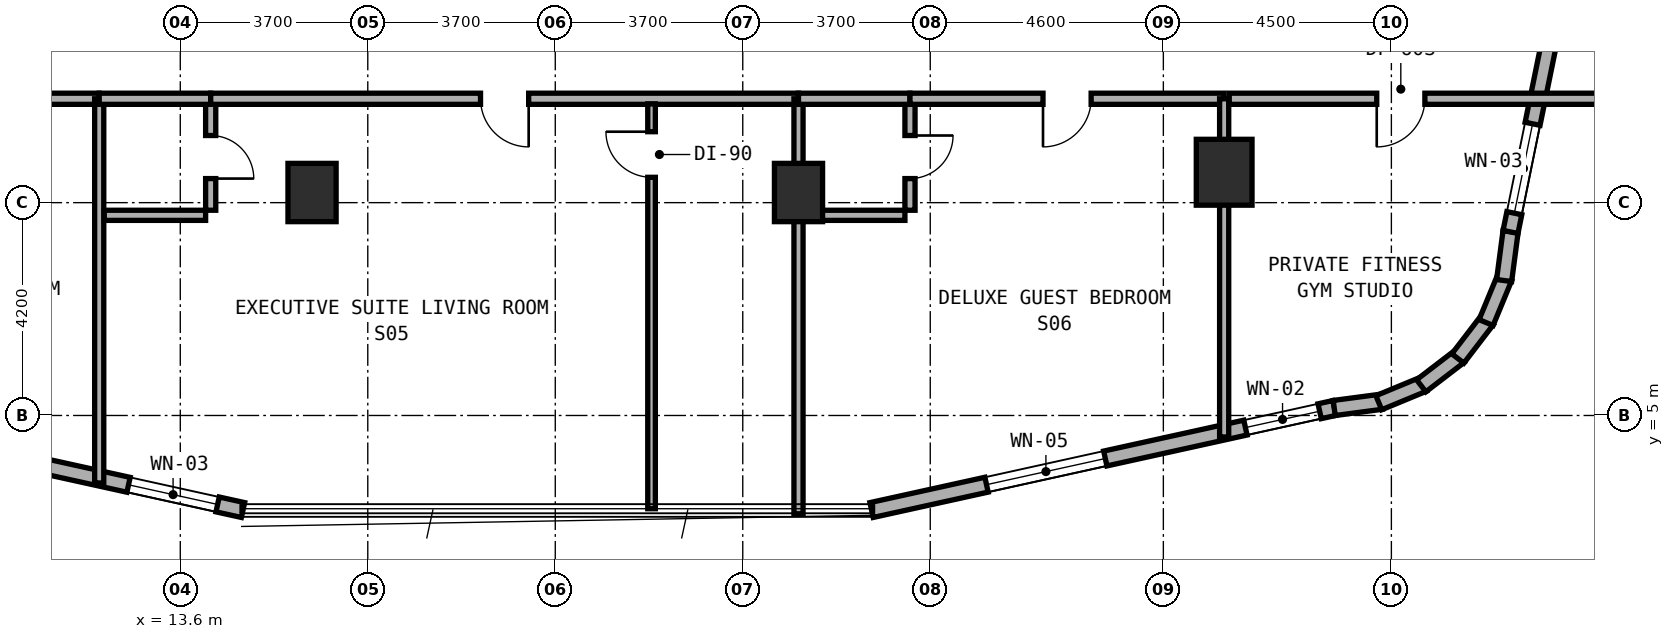
"""IFC4 building model, lengths in metres.
Left out: names, types, materials, properties, quantities, classifications, styles, units other than length and angle.
Written with IfcOpenShell. Run it as: python <this file> out.ifc"""

import sys

from ifc_helpers import new_model, si_unit, direction, frame, frame_2d, origin, origin_2d, place, context, subcontext, project, spatial, rectangle, extrude, element, fill, save


model = new_model("IFC4")
c1 = context("Model", 3, precision=1e-05, world=origin(), true_north=direction((0.0, 1.0)))
c2 = subcontext(c1, "Body", "Model", "MODEL_VIEW")
j1 = project(units=[si_unit("LENGTHUNIT", "METRE"), si_unit("PLANEANGLEUNIT", "RADIAN")], contexts=[c1])
p1 = place(None, origin())
s1 = spatial("IfcSite", under=j1, at=p1, CompositionType="ELEMENT")
p2 = place(p1, origin())
s2 = spatial("IfcBuilding", under=s1, at=p2, CompositionType="ELEMENT")
p3 = place(p2, frame((0.0, 0.0, 38.0)))
s3 = spatial("IfcBuildingStorey", under=s2, at=p3, CompositionType="ELEMENT", Elevation=38.0)
for number, where, z_axis, x_axis in (
    (1, (16.2, 9.4, 0.0), (0.0, 0.0, 1.0), (1.0, 0.0, 0.0)),
    (2, (25.8, 9.4, 0.0), (0.0, 0.0, 1.0), (1.0, 0.0, 0.0)),
):
    element("IfcColumn", number, at=place(p3, frame(where, z_axis=z_axis, x_axis=x_axis)), inside=s3, PredefinedType="COLUMN", context=c2, shape_type="SweptSolid", body=[
        extrude(rectangle(XDim=0.95, YDim=1.15, at=origin_2d()), origin(), (0.0, 0.0, 1.0), 3.5),
    ])
p4 = place(p3, frame((34.2, 9.8, 0.0), z_axis=(0.0, 0.0, 1.0), x_axis=(1.0, 0.0, 0.0)))
e3 = element("IfcColumn", 3, at=p4, inside=s3, PredefinedType="COLUMN", context=c2, shape_type="SweptSolid", body=[
    extrude(rectangle(XDim=1.1, YDim=1.3, at=origin_2d()), origin(), (0.0, 0.0, 1.0), 3.5),
])
p5 = place(p3, frame((5.704, 5.148, 0.0), z_axis=(0.0, 0.0, 1.0), x_axis=(0.9765437942, -0.215318875183, 0.0)))
e4 = element("IfcWall", 4, at=p5, inside=s3, PredefinedType="STANDARD", context=c2, shape_type="SweptSolid", body=[
    extrude(rectangle(XDim=9.353, YDim=0.3, at=frame_2d((4.677, 0.0))), origin(), (0.0, 0.0, 1.0), 3.22),
])
p6 = place(p5, frame((1.958, 0.0, 0.8)))
e5 = element("IfcOpeningElement", 5, at=p6, cuts=e4, PredefinedType="OPENING", context=c2, shape_type="SweptSolid", body=[
    extrude(rectangle(XDim=2.4, YDim=1.6, at=frame_2d((1.2, 0.8))), frame((0.0, 0.16, 0.0), z_axis=(0.0, -1.0, 0.0), x_axis=(1.0, 0.0, 0.0)), (0.0, 0.0, 1.0), 0.32),
])
p7 = place(p5, frame((7.04, 0.0, 0.85)))
e6 = element("IfcOpeningElement", 6, at=p7, cuts=e4, PredefinedType="OPENING", context=c2, shape_type="SweptSolid", body=[
    extrude(rectangle(XDim=1.8, YDim=1.5, at=frame_2d((0.9, 0.75))), frame((0.0, 0.16, 0.0), z_axis=(0.0, -1.0, 0.0), x_axis=(1.0, 0.0, 0.0)), (0.0, 0.0, 1.0), 0.32),
])
p8 = place(p3, frame((27.242, 3.134, 0.0), z_axis=(0.0, 0.0, 1.0), x_axis=(0.97654500432, 0.215313386808, 0.0)))
e7 = element("IfcWall", 7, at=p8, inside=s3, PredefinedType="STANDARD", context=c2, shape_type="SweptSolid", body=[
    extrude(rectangle(XDim=9.354, YDim=0.3, at=frame_2d((4.677, 0.0))), origin(), (0.0, 0.0, 1.0), 3.22),
])
p9 = place(p8, frame((2.323, 0.0, 0.8)))
e8 = element("IfcOpeningElement", 8, at=p9, cuts=e7, PredefinedType="OPENING", context=c2, shape_type="SweptSolid", body=[
    extrude(rectangle(XDim=2.4, YDim=1.6, at=frame_2d((1.2, 0.8))), frame((0.0, 0.16, 0.0), z_axis=(0.0, -1.0, 0.0), x_axis=(1.0, 0.0, 0.0)), (0.0, 0.0, 1.0), 0.32),
])
p10 = place(p8, frame((7.555, 0.0, 0.85)))
e9 = element("IfcOpeningElement", 9, at=p10, cuts=e7, PredefinedType="OPENING", context=c2, shape_type="SweptSolid", body=[
    extrude(rectangle(XDim=1.5, YDim=1.5, at=frame_2d((0.75, 0.75))), frame((0.0, 0.16, 0.0), z_axis=(0.0, -1.0, 0.0), x_axis=(1.0, 0.0, 0.0)), (0.0, 0.0, 1.0), 0.32),
])
p11 = place(p3, frame((36.372, 5.148, 0.0), z_axis=(0.0, 0.0, 1.0), x_axis=(0.991359246108, 0.131174864804, 0.0)))
e10 = element("IfcWall", 10, at=p11, inside=s3, PredefinedType="STANDARD", context=c2, shape_type="SweptSolid", body=[
    extrude(rectangle(XDim=0.938, YDim=0.3, at=frame_2d((0.469, 0.0))), origin(), (0.0, 0.0, 1.0), 3.22),
])
p12 = place(p3, frame((37.252, 5.252, 0.0), z_axis=(0.0, 0.0, 1.0), x_axis=(0.924019948111, 0.382344263057, 0.0)))
e11 = element("IfcWall", 11, at=p12, inside=s3, PredefinedType="STANDARD", context=c2, shape_type="SweptSolid", body=[
    extrude(rectangle(XDim=0.955, YDim=0.3, at=frame_2d((0.477, 0.0))), origin(), (0.0, 0.0, 1.0), 3.22),
])
p13 = place(p3, frame((38.089, 5.586, 0.0), z_axis=(0.0, 0.0, 1.0), x_axis=(0.793573440799, 0.608474481025, 0.0)))
e12 = element("IfcWall", 12, at=p13, inside=s3, PredefinedType="STANDARD", context=c2, shape_type="SweptSolid", body=[
    extrude(rectangle(XDim=0.955, YDim=0.3, at=frame_2d((0.478, 0.0))), origin(), (0.0, 0.0, 1.0), 3.22),
])
p14 = place(p3, frame((38.812, 6.125, 0.0), z_axis=(0.0, 0.0, 1.0), x_axis=(0.608351047625, 0.793668068435, 0.0)))
e13 = element("IfcWall", 13, at=p14, inside=s3, PredefinedType="STANDARD", context=c2, shape_type="SweptSolid", body=[
    extrude(rectangle(XDim=0.955, YDim=0.3, at=frame_2d((0.478, 0.0))), origin(), (0.0, 0.0, 1.0), 3.22),
])
p15 = place(p3, frame((39.369, 6.834, 0.0), z_axis=(0.0, 0.0, 1.0), x_axis=(0.382344263057, 0.924019948111, 0.0)))
e14 = element("IfcWall", 14, at=p15, inside=s3, PredefinedType="STANDARD", context=c2, shape_type="SweptSolid", body=[
    extrude(rectangle(XDim=0.955, YDim=0.3, at=frame_2d((0.477, 0.0))), origin(), (0.0, 0.0, 1.0), 3.22),
])
p16 = place(p3, frame((39.725, 7.663, 0.0), z_axis=(0.0, 0.0, 1.0), x_axis=(0.130454512571, 0.991454295543, 0.0)))
e15 = element("IfcWall", 15, at=p16, inside=s3, PredefinedType="STANDARD", context=c2, shape_type="SweptSolid", body=[
    extrude(rectangle(XDim=0.973, YDim=0.3, at=frame_2d((0.487, 0.0))), origin(), (0.0, 0.0, 1.0), 3.22),
])
p17 = place(p3, frame((39.851, 8.622, 0.0), z_axis=(0.0, 0.0, 1.0), x_axis=(0.199990901713, 0.979797754249, 0.0)))
e16 = element("IfcWall", 16, at=p17, inside=s3, PredefinedType="STANDARD", context=c2, shape_type="SweptSolid", body=[
    extrude(rectangle(XDim=10.065, YDim=0.3, at=frame_2d((5.033, 0.0))), origin(), (0.0, 0.0, 1.0), 3.22),
])
p18 = place(p17, frame((0.378, 0.0, 0.85)))
e17 = element("IfcOpeningElement", 17, at=p18, cuts=e16, PredefinedType="OPENING", context=c2, shape_type="SweptSolid", body=[
    extrude(rectangle(XDim=1.8, YDim=1.5, at=frame_2d((0.9, 0.75))), frame((0.0, 0.16, 0.0), z_axis=(0.0, -1.0, 0.0), x_axis=(1.0, 0.0, 0.0)), (0.0, 0.0, 1.0), 0.32),
])
p19 = place(p17, frame((5.236, 0.0, 0.8)))
e18 = element("IfcOpeningElement", 18, at=p19, cuts=e16, PredefinedType="OPENING", context=c2, shape_type="SweptSolid", body=[
    extrude(rectangle(XDim=2.4, YDim=1.6, at=frame_2d((1.2, 0.8))), frame((0.0, 0.16, 0.0), z_axis=(0.0, -1.0, 0.0), x_axis=(1.0, 0.0, 0.0)), (0.0, 0.0, 1.0), 0.32),
])
p20 = place(p3, frame((5.55, 11.25, 0.0), z_axis=(0.0, 0.0, 1.0), x_axis=(1.0, 0.0, 0.0)))
e19 = element("IfcWall", 19, at=p20, inside=s3, PredefinedType="SOLIDWALL", context=c2, shape_type="SweptSolid", body=[
    extrude(rectangle(XDim=6.45, YDim=0.22, at=frame_2d((3.225, 0.0))), origin(), (0.0, 0.0, 1.0), 2.395),
])
p21 = place(p20, frame((3.03, 0.0, 0.0)))
e20 = element("IfcOpeningElement", 20, at=p21, cuts=e19, PredefinedType="OPENING", context=c2, shape_type="SweptSolid", body=[
    extrude(rectangle(XDim=0.95, YDim=2.1, at=frame_2d((0.475, 1.05))), frame((0.0, 0.12, 0.0), z_axis=(0.0, -1.0, 0.0), x_axis=(1.0, 0.0, 0.0)), (0.0, 0.0, 1.0), 0.24),
])
p22 = place(p3, frame((12.0, 3.668, 0.0), z_axis=(0.0, 0.0, 1.0), x_axis=(0.0, 1.0, 0.0)))
e21 = element("IfcWall", 21, at=p22, inside=s3, PredefinedType="SOLIDWALL", context=c2, shape_type="SweptSolid", body=[
    extrude(rectangle(XDim=7.582, YDim=0.18, at=frame_2d((3.791, 0.0))), origin(), (0.0, 0.0, 1.0), 2.745),
])
p23 = place(p3, frame((14.2, 9.05, 0.0), z_axis=(0.0, 0.0, 1.0), x_axis=(0.0, 1.0, 0.0)))
e22 = element("IfcWall", 22, at=p23, inside=s3, PredefinedType="PLUMBINGWALL", context=c2, shape_type="SweptSolid", body=[
    extrude(rectangle(XDim=2.1, YDim=0.2, at=frame_2d((1.05, 0.0))), origin(), (0.0, 0.0, 1.0), 2.745),
])
p24 = place(p23, frame((0.625, 0.0, 0.0)))
e23 = element("IfcOpeningElement", 23, at=p24, cuts=e22, PredefinedType="OPENING", context=c2, shape_type="SweptSolid", body=[
    extrude(rectangle(XDim=0.85, YDim=2.1, at=frame_2d((0.425, 1.05))), frame((0.0, 0.11, 0.0), z_axis=(0.0, -1.0, 0.0), x_axis=(1.0, 0.0, 0.0)), (0.0, 0.0, 1.0), 0.22),
])
p25 = place(p3, frame((12.1, 8.95, 0.0), z_axis=(0.0, 0.0, 1.0), x_axis=(1.0, 0.0, 0.0)))
e24 = element("IfcWall", 24, at=p25, inside=s3, PredefinedType="PLUMBINGWALL", context=c2, shape_type="SweptSolid", body=[
    extrude(rectangle(XDim=2.0, YDim=0.2, at=frame_2d((1.0, 0.0))), origin(), (0.0, 0.0, 1.0), 3.22),
])
p26 = place(p3, frame((12.0, 11.25, 0.0), z_axis=(0.0, 0.0, 1.0), x_axis=(1.0, 0.0, 0.0)))
e25 = element("IfcWall", 25, at=p26, inside=s3, PredefinedType="SOLIDWALL", context=c2, shape_type="SweptSolid", body=[
    extrude(rectangle(XDim=2.2, YDim=0.22, at=frame_2d((1.1, 0.0))), origin(), (0.0, 0.0, 1.0), 2.865),
])
p27 = place(p3, frame((14.2, 11.25, 0.0), z_axis=(0.0, 0.0, 1.0), x_axis=(1.0, 0.0, 0.0)))
e26 = element("IfcWall", 26, at=p27, inside=s3, PredefinedType="SOLIDWALL", context=c2, shape_type="SweptSolid", body=[
    extrude(rectangle(XDim=11.6, YDim=0.22, at=frame_2d((5.8, 0.0))), origin(), (0.0, 0.0, 1.0), 2.395),
])
p28 = place(p27, frame((5.325, 0.0, 0.0)))
e27 = element("IfcOpeningElement", 27, at=p28, cuts=e26, PredefinedType="OPENING", context=c2, shape_type="SweptSolid", body=[
    extrude(rectangle(XDim=0.95, YDim=2.1, at=frame_2d((0.475, 1.05))), frame((0.0, 0.12, 0.0), z_axis=(0.0, -1.0, 0.0), x_axis=(1.0, 0.0, 0.0)), (0.0, 0.0, 1.0), 0.24),
])
p29 = place(p3, frame((22.9, 3.16, 0.0), z_axis=(0.0, 0.0, 1.0), x_axis=(0.0, 1.0, 0.0)))
e28 = element("IfcWall", 28, at=p29, inside=s3, PredefinedType="PARTITIONING", context=c2, shape_type="SweptSolid", body=[
    extrude(rectangle(XDim=7.99, YDim=0.15, at=frame_2d((3.995, 0.0))), origin(), (0.0, 0.0, 1.0), 2.745),
])
p30 = place(p29, frame((6.54, 0.0, 0.0)))
e29 = element("IfcOpeningElement", 29, at=p30, cuts=e28, PredefinedType="OPENING", context=c2, shape_type="SweptSolid", body=[
    extrude(rectangle(XDim=0.9, YDim=2.1, at=frame_2d((0.45, 1.05))), frame((0.0, 0.085, 0.0), z_axis=(0.0, -1.0, 0.0), x_axis=(1.0, 0.0, 0.0)), (0.0, 0.0, 1.0), 0.17),
])
p31 = place(p3, frame((25.8, 3.06, 0.0), z_axis=(0.0, 0.0, 1.0), x_axis=(0.0, 1.0, 0.0)))
e30 = element("IfcWall", 30, at=p31, inside=s3, PredefinedType="SOLIDWALL", context=c2, shape_type="SweptSolid", body=[
    extrude(rectangle(XDim=8.19, YDim=0.18, at=frame_2d((4.095, 0.0))), origin(), (0.0, 0.0, 1.0), 2.395),
])
p32 = place(p3, frame((28.0, 9.05, 0.0), z_axis=(0.0, 0.0, 1.0), x_axis=(0.0, 1.0, 0.0)))
e31 = element("IfcWall", 31, at=p32, inside=s3, PredefinedType="PLUMBINGWALL", context=c2, shape_type="SweptSolid", body=[
    extrude(rectangle(XDim=2.1, YDim=0.2, at=frame_2d((1.05, 0.0))), origin(), (0.0, 0.0, 1.0), 2.745),
])
p33 = place(p32, frame((0.625, 0.0, 0.0)))
e32 = element("IfcOpeningElement", 32, at=p33, cuts=e31, PredefinedType="OPENING", context=c2, shape_type="SweptSolid", body=[
    extrude(rectangle(XDim=0.85, YDim=2.1, at=frame_2d((0.425, 1.05))), frame((0.0, 0.11, 0.0), z_axis=(0.0, -1.0, 0.0), x_axis=(1.0, 0.0, 0.0)), (0.0, 0.0, 1.0), 0.22),
])
p34 = place(p3, frame((25.9, 8.95, 0.0), z_axis=(0.0, 0.0, 1.0), x_axis=(1.0, 0.0, 0.0)))
e33 = element("IfcWall", 33, at=p34, inside=s3, PredefinedType="PLUMBINGWALL", context=c2, shape_type="SweptSolid", body=[
    extrude(rectangle(XDim=2.0, YDim=0.2, at=frame_2d((1.0, 0.0))), origin(), (0.0, 0.0, 1.0), 3.22),
])
p35 = place(p3, frame((25.8, 11.25, 0.0), z_axis=(0.0, 0.0, 1.0), x_axis=(1.0, 0.0, 0.0)))
e34 = element("IfcWall", 34, at=p35, inside=s3, PredefinedType="SOLIDWALL", context=c2, shape_type="SweptSolid", body=[
    extrude(rectangle(XDim=2.2, YDim=0.22, at=frame_2d((1.1, 0.0))), origin(), (0.0, 0.0, 1.0), 2.395),
])
p36 = place(p3, frame((28.0, 11.25, 0.0), z_axis=(0.0, 0.0, 1.0), x_axis=(1.0, 0.0, 0.0)))
e35 = element("IfcWall", 35, at=p36, inside=s3, PredefinedType="SOLIDWALL", context=c2, shape_type="SweptSolid", body=[
    extrude(rectangle(XDim=6.2, YDim=0.22, at=frame_2d((3.1, 0.0))), origin(), (0.0, 0.0, 1.0), 2.395),
])
p37 = place(p36, frame((2.625, 0.0, 0.0)))
e36 = element("IfcOpeningElement", 36, at=p37, cuts=e35, PredefinedType="OPENING", context=c2, shape_type="SweptSolid", body=[
    extrude(rectangle(XDim=0.95, YDim=2.1, at=frame_2d((0.475, 1.05))), frame((0.0, 0.12, 0.0), z_axis=(0.0, -1.0, 0.0), x_axis=(1.0, 0.0, 0.0)), (0.0, 0.0, 1.0), 0.24),
])
p38 = place(p3, frame((34.2, 4.576, 0.0), z_axis=(0.0, 0.0, 1.0), x_axis=(0.0, 1.0, 0.0)))
e37 = element("IfcWall", 37, at=p38, inside=s3, PredefinedType="SOLIDWALL", context=c2, shape_type="SweptSolid", body=[
    extrude(rectangle(XDim=6.674, YDim=0.18, at=frame_2d((3.337, 0.0))), origin(), (0.0, 0.0, 1.0), 2.395),
])
p39 = place(p3, frame((34.3, 11.25, 0.0), z_axis=(0.0, 0.0, 1.0), x_axis=(1.0, 0.0, 0.0)))
e38 = element("IfcWall", 38, at=p39, inside=s3, PredefinedType="SOLIDWALL", context=c2, shape_type="SweptSolid", body=[
    extrude(rectangle(XDim=7.44, YDim=0.22, at=frame_2d((3.72, 0.0))), origin(), (0.0, 0.0, 1.0), 2.745),
])
p40 = place(p39, frame((2.911, 0.0, 0.0)))
e39 = element("IfcOpeningElement", 39, at=p40, cuts=e38, PredefinedType="OPENING", context=c2, shape_type="SweptSolid", body=[
    extrude(rectangle(XDim=0.95, YDim=2.1, at=frame_2d((0.475, 1.05))), frame((0.0, 0.12, 0.0), z_axis=(0.0, -1.0, 0.0), x_axis=(1.0, 0.0, 0.0)), (0.0, 0.0, 1.0), 0.24),
])
p41 = place(p7, origin())
e40 = element("IfcWindow", 40, at=p41, inside=s3, PartitioningType="SINGLE_PANEL", PredefinedType="WINDOW", context=c2, shape_type="SweptSolid", body=[
    extrude(rectangle(XDim=1.8, YDim=1.5, at=frame_2d((0.9, 0.75))), frame((0.0, 0.03, 0.0), z_axis=(0.0, -1.0, 0.0), x_axis=(1.0, 0.0, 0.0)), (0.0, 0.0, 1.0), 0.06),
])
fill(e6, e40)
p42 = place(p9, origin())
e41 = element("IfcWindow", 41, at=p42, inside=s3, PartitioningType="SINGLE_PANEL", PredefinedType="WINDOW", context=c2, shape_type="SweptSolid", body=[
    extrude(rectangle(XDim=2.4, YDim=1.6, at=frame_2d((1.2, 0.8))), frame((0.0, 0.03, 0.0), z_axis=(0.0, -1.0, 0.0), x_axis=(1.0, 0.0, 0.0)), (0.0, 0.0, 1.0), 0.06),
])
fill(e8, e41)
p43 = place(p10, origin())
e42 = element("IfcWindow", 42, at=p43, inside=s3, PartitioningType="SINGLE_PANEL", PredefinedType="WINDOW", context=c2, shape_type="SweptSolid", body=[
    extrude(rectangle(XDim=1.5, YDim=1.5, at=frame_2d((0.75, 0.75))), frame((0.0, 0.03, 0.0), z_axis=(0.0, -1.0, 0.0), x_axis=(1.0, 0.0, 0.0)), (0.0, 0.0, 1.0), 0.06),
])
fill(e9, e42)
p44 = place(p18, origin())
e43 = element("IfcWindow", 43, at=p44, inside=s3, PartitioningType="SINGLE_PANEL", PredefinedType="WINDOW", context=c2, shape_type="SweptSolid", body=[
    extrude(rectangle(XDim=1.8, YDim=1.5, at=frame_2d((0.9, 0.75))), frame((0.0, 0.03, 0.0), z_axis=(0.0, -1.0, 0.0), x_axis=(1.0, 0.0, 0.0)), (0.0, 0.0, 1.0), 0.06),
])
fill(e17, e43)
p45 = place(p24, frame((0.85, 0.0, 0.0), z_axis=(0.0, 0.0, 1.0), x_axis=(-1.0, 0.0, 0.0)))
e44 = element("IfcDoor", 44, at=p45, inside=s3, OperationType="SINGLE_SWING_RIGHT", PredefinedType="DOOR", context=c2, shape_type="SweptSolid", body=[
    extrude(rectangle(XDim=0.85, YDim=2.1, at=frame_2d((0.425, 1.05))), frame((0.0, 0.025, 0.0), z_axis=(0.0, -1.0, 0.0), x_axis=(1.0, 0.0, 0.0)), (0.0, 0.0, 1.0), 0.05),
])
fill(e23, e44)
p46 = place(p28, frame((0.95, 0.0, 0.0), z_axis=(0.0, 0.0, 1.0), x_axis=(-1.0, 0.0, 0.0)))
e45 = element("IfcDoor", 45, at=p46, inside=s3, OperationType="SINGLE_SWING_LEFT", PredefinedType="DOOR", context=c2, shape_type="SweptSolid", body=[
    extrude(rectangle(XDim=0.95, YDim=2.1, at=frame_2d((0.475, 1.05))), frame((0.0, 0.025, 0.0), z_axis=(0.0, -1.0, 0.0), x_axis=(1.0, 0.0, 0.0)), (0.0, 0.0, 1.0), 0.05),
])
fill(e27, e45)
p47 = place(p30, origin())
e46 = element("IfcDoor", 46, at=p47, inside=s3, OperationType="SINGLE_SWING_RIGHT", PredefinedType="DOOR", context=c2, shape_type="SweptSolid", body=[
    extrude(rectangle(XDim=0.9, YDim=2.1, at=frame_2d((0.45, 1.05))), frame((0.0, 0.025, 0.0), z_axis=(0.0, -1.0, 0.0), x_axis=(1.0, 0.0, 0.0)), (0.0, 0.0, 1.0), 0.05),
])
fill(e29, e46)
p48 = place(p33, frame((0.85, 0.0, 0.0), z_axis=(0.0, 0.0, 1.0), x_axis=(-1.0, 0.0, 0.0)))
e47 = element("IfcDoor", 47, at=p48, inside=s3, OperationType="SINGLE_SWING_LEFT", PredefinedType="DOOR", context=c2, shape_type="SweptSolid", body=[
    extrude(rectangle(XDim=0.85, YDim=2.1, at=frame_2d((0.425, 1.05))), frame((0.0, 0.025, 0.0), z_axis=(0.0, -1.0, 0.0), x_axis=(1.0, 0.0, 0.0)), (0.0, 0.0, 1.0), 0.05),
])
fill(e32, e47)
p49 = place(p37, frame((0.95, 0.0, 0.0), z_axis=(0.0, 0.0, 1.0), x_axis=(-1.0, 0.0, 0.0)))
e48 = element("IfcDoor", 48, at=p49, inside=s3, OperationType="SINGLE_SWING_RIGHT", PredefinedType="DOOR", context=c2, shape_type="SweptSolid", body=[
    extrude(rectangle(XDim=0.95, YDim=2.1, at=frame_2d((0.475, 1.05))), frame((0.0, 0.025, 0.0), z_axis=(0.0, -1.0, 0.0), x_axis=(1.0, 0.0, 0.0)), (0.0, 0.0, 1.0), 0.05),
])
fill(e36, e48)
p50 = place(p40, frame((0.95, 0.0, 0.0), z_axis=(0.0, 0.0, 1.0), x_axis=(-1.0, 0.0, 0.0)))
e49 = element("IfcDoor", 49, at=p50, inside=s3, OperationType="SINGLE_SWING_RIGHT", PredefinedType="DOOR", context=c2, shape_type="SweptSolid", body=[
    extrude(rectangle(XDim=0.95, YDim=2.1, at=frame_2d((0.475, 1.05))), frame((0.0, 0.025, 0.0), z_axis=(0.0, -1.0, 0.0), x_axis=(1.0, 0.0, 0.0)), (0.0, 0.0, 1.0), 0.05),
])
fill(e39, e49)
save(model, sys.argv[1])
